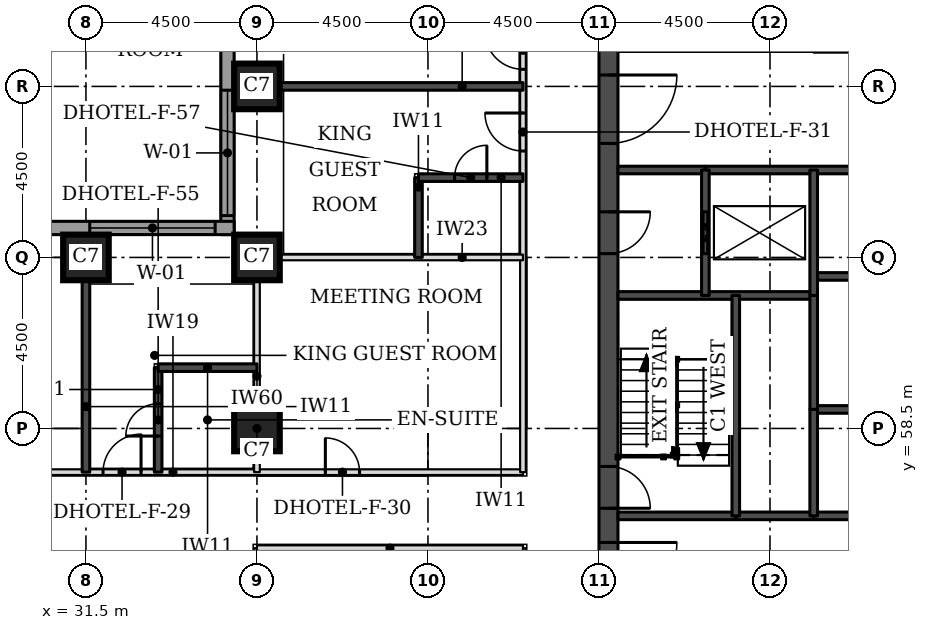
"""IFC4 building model, lengths in metres.
Left out: names, types, materials, properties, quantities, classifications, styles, units other than length and angle.
Written with IfcOpenShell. Run it as: python <this file> out.ifc"""

import sys

from ifc_helpers import new_model, si_unit, direction, frame, frame_2d, origin, origin_2d, place, context, subcontext, project, spatial, rectangle, extrude, element, fill, save


model = new_model("IFC4")
c1 = context("Model", 3, precision=1e-05, world=origin(), true_north=direction((0.0, 1.0)))
c2 = subcontext(c1, "Body", "Model", "MODEL_VIEW")
j1 = project(units=[si_unit("LENGTHUNIT", "METRE"), si_unit("PLANEANGLEUNIT", "RADIAN")], contexts=[c1])
p1 = place(None, origin())
s1 = spatial("IfcSite", under=j1, at=p1, CompositionType="ELEMENT")
p2 = place(p1, origin())
s2 = spatial("IfcBuilding", under=s1, at=p2, CompositionType="ELEMENT")
p3 = place(p2, frame((0.0, 0.0, 42.9)))
s3 = spatial("IfcBuildingStorey", under=s2, at=p3, CompositionType="ELEMENT", Elevation=42.9)
for number, where, z_axis, x_axis in (
    (1, (36.0, 58.5, 0.0), (0.0, 0.0, 1.0), (1.0, 0.0, 0.0)),
    (2, (31.5, 63.0, 0.0), (0.0, 0.0, 1.0), (1.0, 0.0, 0.0)),
    (3, (36.0, 63.0, 0.0), (0.0, 0.0, 1.0), (1.0, 0.0, 0.0)),
    (4, (36.0, 67.5, 0.0), (0.0, 0.0, 1.0), (1.0, 0.0, 0.0)),
):
    element("IfcColumn", number, at=place(p3, frame(where, z_axis=z_axis, x_axis=x_axis)), inside=s3, PredefinedType="COLUMN", context=c2, shape_type="SweptSolid", body=[
        extrude(rectangle(XDim=1.2, YDim=1.2, at=origin_2d()), origin(), (0.0, 0.0, 1.0), 3.3),
    ])
p4 = place(p3, frame((45.25, 49.5, 0.0), z_axis=(0.0, 0.0, 1.0), x_axis=(0.0, 1.0, 0.0)))
e5 = element("IfcWall", 5, at=p4, inside=s3, PredefinedType="SHEAR", context=c2, shape_type="SweptSolid", body=[
    extrude(rectangle(XDim=22.5, YDim=0.5, at=frame_2d((11.25, 0.0))), origin(), (0.0, 0.0, 1.0), 3.3),
])
p5 = place(p4, frame((4.2, 0.0, 0.0)))
e6 = element("IfcOpeningElement", 6, at=p5, cuts=e5, PredefinedType="OPENING", context=c2, shape_type="SweptSolid", body=[
    extrude(rectangle(XDim=1.8, YDim=2.1, at=frame_2d((0.9, 1.05))), frame((0.0, 0.26, 0.0), z_axis=(0.0, -1.0, 0.0), x_axis=(1.0, 0.0, 0.0)), (0.0, 0.0, 1.0), 0.52),
])
p6 = place(p4, frame((6.9, 0.0, 0.0)))
e7 = element("IfcOpeningElement", 7, at=p6, cuts=e5, PredefinedType="OPENING", context=c2, shape_type="SweptSolid", body=[
    extrude(rectangle(XDim=1.1, YDim=2.1, at=frame_2d((0.55, 1.05))), frame((0.0, 0.26, 0.0), z_axis=(0.0, -1.0, 0.0), x_axis=(1.0, 0.0, 0.0)), (0.0, 0.0, 1.0), 0.52),
])
p7 = place(p4, frame((13.6, 0.0, 0.0)))
e8 = element("IfcOpeningElement", 8, at=p7, cuts=e5, PredefinedType="OPENING", context=c2, shape_type="SweptSolid", body=[
    extrude(rectangle(XDim=1.1, YDim=2.1, at=frame_2d((0.55, 1.05))), frame((0.0, 0.26, 0.0), z_axis=(0.0, -1.0, 0.0), x_axis=(1.0, 0.0, 0.0)), (0.0, 0.0, 1.0), 0.52),
])
p8 = place(p4, frame((16.5, 0.0, 0.0)))
e9 = element("IfcOpeningElement", 9, at=p8, cuts=e5, PredefinedType="OPENING", context=c2, shape_type="SweptSolid", body=[
    extrude(rectangle(XDim=1.8, YDim=2.1, at=frame_2d((0.9, 1.05))), frame((0.0, 0.26, 0.0), z_axis=(0.0, -1.0, 0.0), x_axis=(1.0, 0.0, 0.0)), (0.0, 0.0, 1.0), 0.52),
])
p9 = place(p3, frame((35.225, 76.894, 0.0), z_axis=(0.0, 0.0, 1.0), x_axis=(0.0, -1.0, 0.0)))
e10 = element("IfcWall", 10, at=p9, inside=s3, PredefinedType="STANDARD", context=c2, shape_type="SweptSolid", body=[
    extrude(rectangle(XDim=13.293, YDim=0.35, at=frame_2d((6.647, 0.0))), origin(), (0.0, 0.0, 1.0), 3.055),
])
p10 = place(p9, frame((9.493, 0.0, 0.8)))
e11 = element("IfcOpeningElement", 11, at=p10, cuts=e10, PredefinedType="OPENING", context=c2, shape_type="SweptSolid", body=[
    extrude(rectangle(XDim=3.3, YDim=1.5, at=frame_2d((1.65, 0.75))), frame((0.0, 0.185, 0.0), z_axis=(0.0, -1.0, 0.0), x_axis=(1.0, 0.0, 0.0)), (0.0, 0.0, 1.0), 0.37),
])
p11 = place(p3, frame((35.4, 63.775, 0.0), z_axis=(0.0, 0.0, 1.0), x_axis=(-1.0, 0.0, 0.0)))
e12 = element("IfcWall", 12, at=p11, inside=s3, PredefinedType="STANDARD", context=c2, shape_type="SweptSolid", body=[
    extrude(rectangle(XDim=17.793, YDim=0.35, at=frame_2d((8.897, 0.0))), origin(), (0.0, 0.0, 1.0), 3.055),
])
p12 = place(p11, frame((0.5, 0.0, 0.8)))
e13 = element("IfcOpeningElement", 13, at=p12, cuts=e12, PredefinedType="OPENING", context=c2, shape_type="SweptSolid", body=[
    extrude(rectangle(XDim=3.3, YDim=1.5, at=frame_2d((1.65, 0.75))), frame((0.0, 0.185, 0.0), z_axis=(0.0, -1.0, 0.0), x_axis=(1.0, 0.0, 0.0)), (0.0, 0.0, 1.0), 0.37),
])
p13 = place(p11, frame((9.0, 0.0, 0.8)))
e14 = element("IfcOpeningElement", 14, at=p13, cuts=e12, PredefinedType="OPENING", context=c2, shape_type="SweptSolid", body=[
    extrude(rectangle(XDim=3.3, YDim=1.5, at=frame_2d((1.65, 0.75))), frame((0.0, 0.185, 0.0), z_axis=(0.0, -1.0, 0.0), x_axis=(1.0, 0.0, 0.0)), (0.0, 0.0, 1.0), 0.37),
])
p14 = place(p3, frame((43.0, 47.5, 0.0), z_axis=(0.0, 0.0, 1.0), x_axis=(0.0, 1.0, 0.0)))
e15 = element("IfcWall", 15, at=p14, inside=s3, PredefinedType="PARTITIONING", context=c2, shape_type="SweptSolid", body=[
    extrude(rectangle(XDim=7.85, YDim=0.15, at=frame_2d((3.925, 0.0))), origin(), (0.0, 0.0, 1.0), 3.08),
])
p15 = place(p14, frame((3.475, 0.0, 0.0)))
e16 = element("IfcOpeningElement", 16, at=p15, cuts=e15, PredefinedType="OPENING", context=c2, shape_type="SweptSolid", body=[
    extrude(rectangle(XDim=0.9, YDim=2.1, at=frame_2d((0.45, 1.05))), frame((0.0, 0.085, 0.0), z_axis=(0.0, -1.0, 0.0), x_axis=(1.0, 0.0, 0.0)), (0.0, 0.0, 1.0), 0.17),
])
p16 = place(p3, frame((36.0, 54.05, 0.0), z_axis=(0.0, 0.0, 1.0), x_axis=(0.0, 1.0, 0.0)))
e17 = element("IfcWall", 17, at=p16, inside=s3, PredefinedType="PARTITIONING", context=c2, shape_type="SweptSolid", body=[
    extrude(rectangle(XDim=1.3, YDim=0.15, at=frame_2d((0.65, 0.0))), origin(), (0.0, 0.0, 1.0), 2.33),
])
p17 = place(p3, frame((36.0, 55.35, 0.0), z_axis=(0.0, 0.0, 1.0), x_axis=(1.0, 0.0, 0.0)))
e18 = element("IfcWall", 18, at=p17, inside=s3, PredefinedType="PARTITIONING", context=c2, shape_type="SweptSolid", body=[
    extrude(rectangle(XDim=7.0, YDim=0.15, at=frame_2d((3.5, 0.0))), origin(), (0.0, 0.0, 1.0), 3.08),
])
p18 = place(p3, frame((29.38, 57.35, 0.0), z_axis=(0.0, 0.0, 1.0), x_axis=(1.0, 0.0, 0.0)))
e19 = element("IfcWall", 19, at=p18, inside=s3, PredefinedType="PARTITIONING", context=c2, shape_type="SweptSolid", body=[
    extrude(rectangle(XDim=13.62, YDim=0.15, at=frame_2d((6.81, 0.0))), origin(), (0.0, 0.0, 1.0), 3.08),
])
p19 = place(p18, frame((2.57, 0.0, 0.0)))
e20 = element("IfcOpeningElement", 20, at=p19, cuts=e19, PredefinedType="OPENING", context=c2, shape_type="SweptSolid", body=[
    extrude(rectangle(XDim=1.0, YDim=2.1, at=frame_2d((0.5, 1.05))), frame((0.0, 0.085, 0.0), z_axis=(0.0, -1.0, 0.0), x_axis=(1.0, 0.0, 0.0)), (0.0, 0.0, 1.0), 0.17),
])
p20 = place(p18, frame((8.42, 0.0, 0.0)))
e21 = element("IfcOpeningElement", 21, at=p20, cuts=e19, PredefinedType="OPENING", context=c2, shape_type="SweptSolid", body=[
    extrude(rectangle(XDim=0.9, YDim=2.1, at=frame_2d((0.45, 1.05))), frame((0.0, 0.085, 0.0), z_axis=(0.0, -1.0, 0.0), x_axis=(1.0, 0.0, 0.0)), (0.0, 0.0, 1.0), 0.17),
])
p21 = place(p3, frame((43.0, 57.35, 0.0), z_axis=(0.0, 0.0, 1.0), x_axis=(0.0, 1.0, 0.0)))
e22 = element("IfcWall", 22, at=p21, inside=s3, PredefinedType="PARTITIONING", context=c2, shape_type="SweptSolid", body=[
    extrude(rectangle(XDim=16.65, YDim=0.15, at=frame_2d((8.325, 0.0))), origin(), (0.0, 0.0, 1.0), 3.08),
])
p22 = place(p21, frame((8.45, 0.0, 0.0)))
e23 = element("IfcOpeningElement", 23, at=p22, cuts=e22, PredefinedType="OPENING", context=c2, shape_type="SweptSolid", body=[
    extrude(rectangle(XDim=1.0, YDim=2.1, at=frame_2d((0.5, 1.05))), frame((0.0, 0.085, 0.0), z_axis=(0.0, -1.0, 0.0), x_axis=(1.0, 0.0, 0.0)), (0.0, 0.0, 1.0), 0.17),
])
p23 = place(p21, frame((10.6, 0.0, 0.0)))
e24 = element("IfcOpeningElement", 24, at=p23, cuts=e22, PredefinedType="OPENING", context=c2, shape_type="SweptSolid", body=[
    extrude(rectangle(XDim=1.0, YDim=2.1, at=frame_2d((0.5, 1.05))), frame((0.0, 0.085, 0.0), z_axis=(0.0, -1.0, 0.0), x_axis=(1.0, 0.0, 0.0)), (0.0, 0.0, 1.0), 0.17),
])
p24 = place(p21, frame((15.203, 0.0, 0.0)))
e25 = element("IfcOpeningElement", 25, at=p24, cuts=e22, PredefinedType="OPENING", context=c2, shape_type="SweptSolid", body=[
    extrude(rectangle(XDim=1.0, YDim=2.1, at=frame_2d((0.5, 1.05))), frame((0.0, 0.085, 0.0), z_axis=(0.0, -1.0, 0.0), x_axis=(1.0, 0.0, 0.0)), (0.0, 0.0, 1.0), 0.17),
])
p25 = place(p3, frame((31.5, 57.35, 0.0), z_axis=(0.0, 0.0, 1.0), x_axis=(0.0, 1.0, 0.0)))
e26 = element("IfcWall", 26, at=p25, inside=s3, PredefinedType="SOLIDWALL", context=c2, shape_type="SweptSolid", body=[
    extrude(rectangle(XDim=5.05, YDim=0.2, at=frame_2d((2.525, 0.0))), origin(), (0.0, 0.0, 1.0), 3.08),
])
p26 = place(p3, frame((33.4, 57.35, 0.0), z_axis=(0.0, 0.0, 1.0), x_axis=(0.0, 1.0, 0.0)))
e27 = element("IfcWall", 27, at=p26, inside=s3, PredefinedType="SOLIDWALL", context=c2, shape_type="SweptSolid", body=[
    extrude(rectangle(XDim=2.75, YDim=0.2, at=frame_2d((1.375, 0.0))), origin(), (0.0, 0.0, 1.0), 3.08),
])
p27 = place(p26, frame((0.95, 0.0, 0.0)))
e28 = element("IfcOpeningElement", 28, at=p27, cuts=e27, PredefinedType="OPENING", context=c2, shape_type="SweptSolid", body=[
    extrude(rectangle(XDim=0.85, YDim=2.1, at=frame_2d((0.425, 1.05))), frame((0.0, 0.11, 0.0), z_axis=(0.0, -1.0, 0.0), x_axis=(1.0, 0.0, 0.0)), (0.0, 0.0, 1.0), 0.22),
])
p28 = place(p3, frame((33.4, 60.1, 0.0), z_axis=(0.0, 0.0, 1.0), x_axis=(1.0, 0.0, 0.0)))
e29 = element("IfcWall", 29, at=p28, inside=s3, PredefinedType="SOLIDWALL", context=c2, shape_type="SweptSolid", body=[
    extrude(rectangle(XDim=2.6, YDim=0.2, at=frame_2d((1.3, 0.0))), origin(), (0.0, 0.0, 1.0), 3.08),
])
p29 = place(p3, frame((40.25, 63.0, 0.0), z_axis=(0.0, 0.0, 1.0), x_axis=(0.0, 1.0, 0.0)))
e30 = element("IfcWall", 30, at=p29, inside=s3, PredefinedType="SOLIDWALL", context=c2, shape_type="SweptSolid", body=[
    extrude(rectangle(XDim=2.1, YDim=0.2, at=frame_2d((1.05, 0.0))), origin(), (0.0, 0.0, 1.0), 3.08),
])
p30 = place(p3, frame((40.25, 65.1, 0.0), z_axis=(0.0, 0.0, 1.0), x_axis=(1.0, 0.0, 0.0)))
e31 = element("IfcWall", 31, at=p30, inside=s3, PredefinedType="SOLIDWALL", context=c2, shape_type="SweptSolid", body=[
    extrude(rectangle(XDim=2.75, YDim=0.2, at=frame_2d((1.375, 0.0))), origin(), (0.0, 0.0, 1.0), 3.08),
])
p31 = place(p30, frame((0.95, 0.0, 0.0)))
e32 = element("IfcOpeningElement", 32, at=p31, cuts=e31, PredefinedType="OPENING", context=c2, shape_type="SweptSolid", body=[
    extrude(rectangle(XDim=0.85, YDim=2.1, at=frame_2d((0.425, 1.05))), frame((0.0, 0.11, 0.0), z_axis=(0.0, -1.0, 0.0), x_axis=(1.0, 0.0, 0.0)), (0.0, 0.0, 1.0), 0.22),
])
p32 = place(p3, frame((36.6, 67.5, 0.0), z_axis=(0.0, 0.0, 1.0), x_axis=(1.0, 0.0, 0.0)))
e33 = element("IfcWall", 33, at=p32, inside=s3, PredefinedType="SOLIDWALL", context=c2, shape_type="SweptSolid", body=[
    extrude(rectangle(XDim=6.4, YDim=0.2, at=frame_2d((3.2, 0.0))), origin(), (0.0, 0.0, 1.0), 3.08),
])
p33 = place(p3, frame((36.0, 57.35, 0.0), z_axis=(0.0, 0.0, 1.0), x_axis=(0.0, 1.0, 0.0)))
e34 = element("IfcWall", 34, at=p33, inside=s3, PredefinedType="PARTITIONING", context=c2, shape_type="SweptSolid", body=[
    extrude(rectangle(XDim=5.05, YDim=0.15, at=frame_2d((2.525, 0.0))), origin(), (0.0, 0.0, 1.0), 2.33),
])
p34 = place(p3, frame((36.6, 63.0, 0.0), z_axis=(0.0, 0.0, 1.0), x_axis=(1.0, 0.0, 0.0)))
e35 = element("IfcWall", 35, at=p34, inside=s3, PredefinedType="PARTITIONING", context=c2, shape_type="SweptSolid", body=[
    extrude(rectangle(XDim=6.4, YDim=0.15, at=frame_2d((3.2, 0.0))), origin(), (0.0, 0.0, 1.0), 3.08),
])
p35 = place(p3, frame((48.6, 56.2, 0.0), z_axis=(0.0, 0.0, 1.0), x_axis=(1.0, 0.0, 0.0)))
e36 = element("IfcWall", 36, at=p35, inside=s3, PredefinedType="SOLIDWALL", context=c2, shape_type="SweptSolid", body=[
    extrude(rectangle(XDim=2.05, YDim=0.2, at=frame_2d((1.025, 0.0))), origin(), (0.0, 0.0, 1.0), 3.08),
])
p36 = place(p3, frame((45.5, 56.2, 0.0), z_axis=(0.0, 0.0, 1.0), x_axis=(1.0, 0.0, 0.0)))
e37 = element("IfcWall", 37, at=p36, inside=s3, PredefinedType="SOLIDWALL", context=c2, shape_type="SweptSolid", body=[
    extrude(rectangle(XDim=3.1, YDim=0.2, at=frame_2d((1.55, 0.0))), origin(), (0.0, 0.0, 1.0), 3.08),
])
p37 = place(p3, frame((50.65, 56.2, 0.0), z_axis=(0.0, 0.0, 1.0), x_axis=(1.0, 0.0, 0.0)))
e38 = element("IfcWall", 38, at=p37, inside=s3, PredefinedType="SOLIDWALL", context=c2, shape_type="SweptSolid", body=[
    extrude(rectangle(XDim=11.2, YDim=0.2, at=frame_2d((5.6, 0.0))), origin(), (0.0, 0.0, 1.0), 3.08),
])
p38 = place(p3, frame((50.65, 59.0, 0.0), z_axis=(0.0, 0.0, 1.0), x_axis=(1.0, 0.0, 0.0)))
e39 = element("IfcWall", 39, at=p38, inside=s3, PredefinedType="SOLIDWALL", context=c2, shape_type="SweptSolid", body=[
    extrude(rectangle(XDim=11.2, YDim=0.2, at=frame_2d((5.6, 0.0))), origin(), (0.0, 0.0, 1.0), 3.3),
])
p39 = place(p3, frame((45.5, 62.0, 0.0), z_axis=(0.0, 0.0, 1.0), x_axis=(1.0, 0.0, 0.0)))
e40 = element("IfcWall", 40, at=p39, inside=s3, PredefinedType="SOLIDWALL", context=c2, shape_type="SweptSolid", body=[
    extrude(rectangle(XDim=5.15, YDim=0.2, at=frame_2d((2.575, 0.0))), origin(), (0.0, 0.0, 1.0), 3.08),
])
p40 = place(p3, frame((50.65, 62.5, 0.0), z_axis=(0.0, 0.0, 1.0), x_axis=(1.0, 0.0, 0.0)))
e41 = element("IfcWall", 41, at=p40, inside=s3, PredefinedType="SOLIDWALL", context=c2, shape_type="SweptSolid", body=[
    extrude(rectangle(XDim=11.2, YDim=0.2, at=frame_2d((5.6, 0.0))), origin(), (0.0, 0.0, 1.0), 3.3),
])
p41 = place(p3, frame((45.5, 65.3, 0.0), z_axis=(0.0, 0.0, 1.0), x_axis=(1.0, 0.0, 0.0)))
e42 = element("IfcWall", 42, at=p41, inside=s3, PredefinedType="SOLIDWALL", context=c2, shape_type="SweptSolid", body=[
    extrude(rectangle(XDim=2.3, YDim=0.2, at=frame_2d((1.15, 0.0))), origin(), (0.0, 0.0, 1.0), 3.08),
])
p42 = place(p3, frame((47.8, 65.3, 0.0), z_axis=(0.0, 0.0, 1.0), x_axis=(1.0, 0.0, 0.0)))
e43 = element("IfcWall", 43, at=p42, inside=s3, PredefinedType="SOLIDWALL", context=c2, shape_type="SweptSolid", body=[
    extrude(rectangle(XDim=16.9, YDim=0.2, at=frame_2d((8.45, 0.0))), origin(), (0.0, 0.0, 1.0), 3.08),
])
p43 = place(p3, frame((47.8, 62.0, 0.0), z_axis=(0.0, 0.0, 1.0), x_axis=(0.0, 1.0, 0.0)))
e44 = element("IfcWall", 44, at=p43, inside=s3, PredefinedType="SOLIDWALL", context=c2, shape_type="SweptSolid", body=[
    extrude(rectangle(XDim=3.3, YDim=0.2, at=frame_2d((1.65, 0.0))), origin(), (0.0, 0.0, 1.0), 3.08),
])
p44 = place(p43, frame((1.1, 0.0, 0.0)))
e45 = element("IfcOpeningElement", 45, at=p44, cuts=e44, PredefinedType="OPENING", context=c2, shape_type="SweptSolid", body=[
    extrude(rectangle(XDim=1.1, YDim=2.1, at=frame_2d((0.55, 1.05))), frame((0.0, 0.11, 0.0), z_axis=(0.0, -1.0, 0.0), x_axis=(1.0, 0.0, 0.0)), (0.0, 0.0, 1.0), 0.22),
])
p45 = place(p3, frame((48.6, 56.2, 0.0), z_axis=(0.0, 0.0, 1.0), x_axis=(0.0, 1.0, 0.0)))
e46 = element("IfcWall", 46, at=p45, inside=s3, PredefinedType="SOLIDWALL", context=c2, shape_type="SweptSolid", body=[
    extrude(rectangle(XDim=5.8, YDim=0.2, at=frame_2d((2.9, 0.0))), origin(), (0.0, 0.0, 1.0), 3.08),
])
p46 = place(p3, frame((50.65, 59.0, 0.0), z_axis=(0.0, 0.0, 1.0), x_axis=(0.0, 1.0, 0.0)))
e47 = element("IfcWall", 47, at=p46, inside=s3, PredefinedType="SOLIDWALL", context=c2, shape_type="SweptSolid", body=[
    extrude(rectangle(XDim=3.0, YDim=0.2, at=frame_2d((1.5, 0.0))), origin(), (0.0, 0.0, 1.0), 3.3),
])
p47 = place(p3, frame((50.65, 56.2, 0.0), z_axis=(0.0, 0.0, 1.0), x_axis=(0.0, 1.0, 0.0)))
e48 = element("IfcWall", 48, at=p47, inside=s3, PredefinedType="SOLIDWALL", context=c2, shape_type="SweptSolid", body=[
    extrude(rectangle(XDim=2.8, YDim=0.2, at=frame_2d((1.4, 0.0))), origin(), (0.0, 0.0, 1.0), 3.08),
])
p48 = place(p3, frame((50.65, 62.0, 0.0), z_axis=(0.0, 0.0, 1.0), x_axis=(0.0, 1.0, 0.0)))
e49 = element("IfcWall", 49, at=p48, inside=s3, PredefinedType="SOLIDWALL", context=c2, shape_type="SweptSolid", body=[
    extrude(rectangle(XDim=3.3, YDim=0.2, at=frame_2d((1.65, 0.0))), origin(), (0.0, 0.0, 1.0), 3.08),
])
p49 = place(p10, origin())
e50 = element("IfcWindow", 50, at=p49, inside=s3, PartitioningType="SINGLE_PANEL", PredefinedType="WINDOW", context=c2, shape_type="SweptSolid", body=[
    extrude(rectangle(XDim=3.3, YDim=1.5, at=frame_2d((1.65, 0.75))), frame((0.0, 0.085, 0.0), z_axis=(0.0, -1.0, 0.0), x_axis=(1.0, 0.0, 0.0)), (0.0, 0.0, 1.0), 0.06),
])
fill(e11, e50)
p50 = place(p12, origin())
e51 = element("IfcWindow", 51, at=p50, inside=s3, PartitioningType="SINGLE_PANEL", PredefinedType="WINDOW", context=c2, shape_type="SweptSolid", body=[
    extrude(rectangle(XDim=3.3, YDim=1.5, at=frame_2d((1.65, 0.75))), frame((0.0, 0.085, 0.0), z_axis=(0.0, -1.0, 0.0), x_axis=(1.0, 0.0, 0.0)), (0.0, 0.0, 1.0), 0.06),
])
fill(e13, e51)
p51 = place(p19, origin())
e52 = element("IfcDoor", 52, at=p51, inside=s3, OperationType="SINGLE_SWING_RIGHT", PredefinedType="DOOR", context=c2, shape_type="SweptSolid", body=[
    extrude(rectangle(XDim=1.0, YDim=2.1, at=frame_2d((0.5, 1.05))), frame((0.0, 0.025, 0.0), z_axis=(0.0, -1.0, 0.0), x_axis=(1.0, 0.0, 0.0)), (0.0, 0.0, 1.0), 0.05),
])
fill(e20, e52)
p52 = place(p27, origin())
e53 = element("IfcDoor", 53, at=p52, inside=s3, OperationType="SINGLE_SWING_LEFT", PredefinedType="DOOR", context=c2, shape_type="SweptSolid", body=[
    extrude(rectangle(XDim=0.85, YDim=2.1, at=frame_2d((0.425, 1.05))), frame((0.0, 0.025, 0.0), z_axis=(0.0, -1.0, 0.0), x_axis=(1.0, 0.0, 0.0)), (0.0, 0.0, 1.0), 0.05),
])
fill(e28, e53)
p53 = place(p22, origin())
e54 = element("IfcDoor", 54, at=p53, inside=s3, OperationType="SINGLE_SWING_RIGHT", PredefinedType="DOOR", context=c2, shape_type="SweptSolid", body=[
    extrude(rectangle(XDim=1.0, YDim=2.1, at=frame_2d((0.5, 1.05))), frame((0.0, 0.025, 0.0), z_axis=(0.0, -1.0, 0.0), x_axis=(1.0, 0.0, 0.0)), (0.0, 0.0, 1.0), 0.05),
])
fill(e23, e54)
p54 = place(p31, origin())
e55 = element("IfcDoor", 55, at=p54, inside=s3, OperationType="SINGLE_SWING_RIGHT", PredefinedType="DOOR", context=c2, shape_type="SweptSolid", body=[
    extrude(rectangle(XDim=0.85, YDim=2.1, at=frame_2d((0.425, 1.05))), frame((0.0, 0.025, 0.0), z_axis=(0.0, -1.0, 0.0), x_axis=(1.0, 0.0, 0.0)), (0.0, 0.0, 1.0), 0.05),
])
fill(e32, e55)
p55 = place(p23, origin())
e56 = element("IfcDoor", 56, at=p55, inside=s3, OperationType="SINGLE_SWING_RIGHT", PredefinedType="DOOR", context=c2, shape_type="SweptSolid", body=[
    extrude(rectangle(XDim=1.0, YDim=2.1, at=frame_2d((0.5, 1.05))), frame((0.0, 0.025, 0.0), z_axis=(0.0, -1.0, 0.0), x_axis=(1.0, 0.0, 0.0)), (0.0, 0.0, 1.0), 0.05),
])
fill(e24, e56)
p56 = place(p20, origin())
e57 = element("IfcDoor", 57, at=p56, inside=s3, OperationType="SINGLE_SWING_LEFT", PredefinedType="DOOR", context=c2, shape_type="SweptSolid", body=[
    extrude(rectangle(XDim=0.9, YDim=2.1, at=frame_2d((0.45, 1.05))), frame((0.0, 0.025, 0.0), z_axis=(0.0, -1.0, 0.0), x_axis=(1.0, 0.0, 0.0)), (0.0, 0.0, 1.0), 0.05),
])
fill(e21, e57)
p57 = place(p44, origin())
e58 = element("IfcDoor", 58, at=p57, inside=s3, OperationType="DOUBLE_DOOR_SLIDING", PredefinedType="DOOR", context=c2, shape_type="SweptSolid", body=[
    extrude(rectangle(XDim=1.1, YDim=2.1, at=frame_2d((0.55, 1.05))), frame((0.0, 0.025, 0.0), z_axis=(0.0, -1.0, 0.0), x_axis=(1.0, 0.0, 0.0)), (0.0, 0.0, 1.0), 0.05),
])
fill(e45, e58)
p58 = place(p5, frame((1.8, 0.0, 0.0), z_axis=(0.0, 0.0, 1.0), x_axis=(-1.0, 0.0, 0.0)))
e59 = element("IfcDoor", 59, at=p58, inside=s3, OperationType="SINGLE_SWING_LEFT", PredefinedType="DOOR", context=c2, shape_type="SweptSolid", body=[
    extrude(rectangle(XDim=1.8, YDim=2.1, at=frame_2d((0.9, 1.05))), frame((0.0, 0.025, 0.0), z_axis=(0.0, -1.0, 0.0), x_axis=(1.0, 0.0, 0.0)), (0.0, 0.0, 1.0), 0.05),
])
fill(e6, e59)
p59 = place(p6, frame((1.1, 0.0, 0.0), z_axis=(0.0, 0.0, 1.0), x_axis=(-1.0, 0.0, 0.0)))
e60 = element("IfcDoor", 60, at=p59, inside=s3, OperationType="SINGLE_SWING_RIGHT", PredefinedType="DOOR", context=c2, shape_type="SweptSolid", body=[
    extrude(rectangle(XDim=1.1, YDim=2.1, at=frame_2d((0.55, 1.05))), frame((0.0, 0.025, 0.0), z_axis=(0.0, -1.0, 0.0), x_axis=(1.0, 0.0, 0.0)), (0.0, 0.0, 1.0), 0.05),
])
fill(e7, e60)
p60 = place(p7, frame((1.1, 0.0, 0.0), z_axis=(0.0, 0.0, 1.0), x_axis=(-1.0, 0.0, 0.0)))
e61 = element("IfcDoor", 61, at=p60, inside=s3, OperationType="SINGLE_SWING_LEFT", PredefinedType="DOOR", context=c2, shape_type="SweptSolid", body=[
    extrude(rectangle(XDim=1.1, YDim=2.1, at=frame_2d((0.55, 1.05))), frame((0.0, 0.025, 0.0), z_axis=(0.0, -1.0, 0.0), x_axis=(1.0, 0.0, 0.0)), (0.0, 0.0, 1.0), 0.05),
])
fill(e8, e61)
p61 = place(p8, frame((1.8, 0.0, 0.0), z_axis=(0.0, 0.0, 1.0), x_axis=(-1.0, 0.0, 0.0)))
e62 = element("IfcDoor", 62, at=p61, inside=s3, OperationType="SINGLE_SWING_LEFT", PredefinedType="DOOR", context=c2, shape_type="SweptSolid", body=[
    extrude(rectangle(XDim=1.8, YDim=2.1, at=frame_2d((0.9, 1.05))), frame((0.0, 0.025, 0.0), z_axis=(0.0, -1.0, 0.0), x_axis=(1.0, 0.0, 0.0)), (0.0, 0.0, 1.0), 0.05),
])
fill(e9, e62)
save(model, sys.argv[1])
